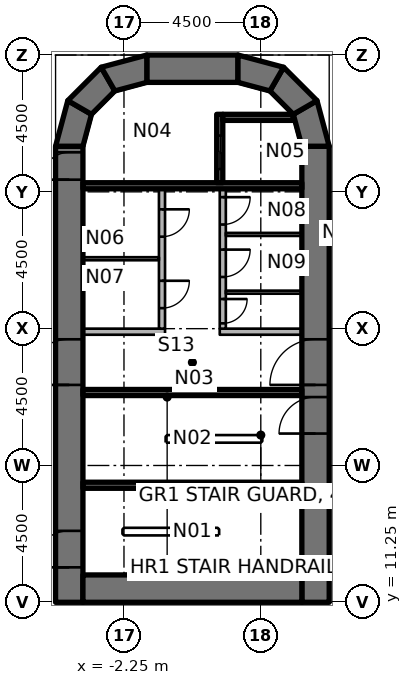
"""IFC4 building model, lengths in metres.
Left out: names, types, materials, properties, quantities, classifications, styles, units other than length and angle.
Written with IfcOpenShell. Run it as: python <this file> out.ifc"""

import sys

from ifc_helpers import new_model, si_unit, direction, frame, frame_2d, origin, place, context, subcontext, project, spatial, polyline, rectangle, outline, extrude, element, fill, save


model = new_model("IFC4")
c1 = context("Model", 3, precision=1e-05, world=origin(), true_north=direction((0.0, 1.0)))
c2 = subcontext(c1, "Body", "Model", "MODEL_VIEW")
j1 = project(units=[si_unit("LENGTHUNIT", "METRE"), si_unit("PLANEANGLEUNIT", "RADIAN")], contexts=[c1])
p1 = place(None, origin())
s1 = spatial("IfcSite", under=j1, at=p1, CompositionType="ELEMENT")
p2 = place(p1, origin())
s2 = spatial("IfcBuilding", under=s1, at=p2, CompositionType="ELEMENT")
p3 = place(p2, frame((0.0, 0.0, -8.0)))
s3 = spatial("IfcBuildingStorey", under=s2, at=p3, CompositionType="ELEMENT", Elevation=-8.0)
p4 = place(p3, frame((-4.05, 11.25, 0.0), z_axis=(0.0, 0.0, 1.0), x_axis=(0.0, 1.0, 0.0)))
e1 = element("IfcWall", 1, at=p4, inside=s3, PredefinedType="SHEAR", context=c2, shape_type="SweptSolid", body=[
    extrude(rectangle(XDim=15.0, YDim=0.9, at=frame_2d((7.5, 0.0))), origin(), (0.0, 0.0, 1.0), 4.0),
])
p5 = place(p4, frame((7.15, 0.0, 0.0)))
e2 = element("IfcOpeningElement", 2, at=p5, cuts=e1, PredefinedType="OPENING", context=c2, shape_type="SweptSolid", body=[
    extrude(rectangle(XDim=1.5, YDim=2.3, at=frame_2d((0.75, 1.15))), frame((0.0, 0.46, 0.0), z_axis=(0.0, -1.0, 0.0), x_axis=(1.0, 0.0, 0.0)), (0.0, 0.0, 1.0), 0.92),
])
p6 = place(p4, frame((13.9, 0.0, 0.0)))
e3 = element("IfcOpeningElement", 3, at=p6, cuts=e1, PredefinedType="OPENING", context=c2, shape_type="SweptSolid", body=[
    extrude(rectangle(XDim=0.9, YDim=2.1, at=frame_2d((0.45, 1.05))), frame((0.0, 0.46, 0.0), z_axis=(0.0, -1.0, 0.0), x_axis=(1.0, 0.0, 0.0)), (0.0, 0.0, 1.0), 0.92),
])
p7 = place(p4, frame((1.15, 0.0, 0.0)))
e4 = element("IfcOpeningElement", 4, at=p7, cuts=e1, PredefinedType="OPENING", context=c2, shape_type="SweptSolid", body=[
    extrude(rectangle(XDim=1.2, YDim=2.1, at=frame_2d((0.6, 1.05))), frame((0.0, 0.46, 0.0), z_axis=(0.0, -1.0, 0.0), x_axis=(1.0, 0.0, 0.0)), (0.0, 0.0, 1.0), 0.92),
])
p8 = place(p3, frame((4.05, 11.25, 0.0), z_axis=(0.0, 0.0, 1.0), x_axis=(0.0, 1.0, 0.0)))
e5 = element("IfcWall", 5, at=p8, inside=s3, PredefinedType="SHEAR", context=c2, shape_type="SweptSolid", body=[
    extrude(rectangle(XDim=15.0, YDim=0.9, at=frame_2d((7.5, 0.0))), origin(), (0.0, 0.0, 1.0), 4.0),
])
p9 = place(p8, frame((7.15, 0.0, 0.0)))
e6 = element("IfcOpeningElement", 6, at=p9, cuts=e5, PredefinedType="OPENING", context=c2, shape_type="SweptSolid", body=[
    extrude(rectangle(XDim=1.5, YDim=2.3, at=frame_2d((0.75, 1.15))), frame((0.0, 0.46, 0.0), z_axis=(0.0, -1.0, 0.0), x_axis=(1.0, 0.0, 0.0)), (0.0, 0.0, 1.0), 0.92),
])
p10 = place(p8, frame((5.55, 0.0, 0.0)))
e7 = element("IfcOpeningElement", 7, at=p10, cuts=e5, PredefinedType="OPENING", context=c2, shape_type="SweptSolid", body=[
    extrude(rectangle(XDim=1.2, YDim=2.1, at=frame_2d((0.6, 1.05))), frame((0.0, 0.46, 0.0), z_axis=(0.0, -1.0, 0.0), x_axis=(1.0, 0.0, 0.0)), (0.0, 0.0, 1.0), 0.92),
])
p11 = place(p3, frame((-3.6, 11.7, 0.0), z_axis=(0.0, 0.0, 1.0), x_axis=(1.0, 0.0, 0.0)))
e8 = element("IfcWall", 8, at=p11, inside=s3, PredefinedType="SHEAR", context=c2, shape_type="SweptSolid", body=[
    extrude(rectangle(XDim=7.2, YDim=0.9, at=frame_2d((3.6, 0.0))), origin(), (0.0, 0.0, 1.0), 4.0),
])
p12 = place(p3, frame((-1.5, 28.8, 0.0), z_axis=(0.0, 0.0, 1.0), x_axis=(1.0, 0.0, 0.0)))
e9 = element("IfcWall", 9, at=p12, inside=s3, PredefinedType="SHEAR", context=c2, shape_type="SweptSolid", body=[
    extrude(rectangle(XDim=3.0, YDim=0.9, at=frame_2d((1.5, 0.0))), origin(), (0.0, 0.0, 1.0), 4.0),
])
p13 = place(p3, origin())
e10 = element("IfcWall", 10, at=p13, inside=s3, PredefinedType="SHEAR", context=c2, shape_type="SweptSolid", body=[
    extrude(outline(polyline([(-4.5, 26.25), (-4.098, 27.75), (-3.319, 27.3), (-3.6, 26.25), (-4.5, 26.25)])), origin(), (0.0, 0.0, 1.0), 4.0),
])
p14 = place(p3, origin())
e11 = element("IfcWall", 11, at=p14, inside=s3, PredefinedType="SHEAR", context=c2, shape_type="SweptSolid", body=[
    extrude(outline(polyline([(-4.098, 27.75), (-3.0, 28.848), (-2.55, 28.069), (-3.319, 27.3), (-4.098, 27.75)])), origin(), (0.0, 0.0, 1.0), 4.0),
])
p15 = place(p3, origin())
e12 = element("IfcWall", 12, at=p15, inside=s3, PredefinedType="SHEAR", context=c2, shape_type="SweptSolid", body=[
    extrude(outline(polyline([(-3.0, 28.848), (-1.5, 29.25), (-1.5, 28.35), (-2.55, 28.069), (-3.0, 28.848)])), origin(), (0.0, 0.0, 1.0), 4.0),
])
p16 = place(p3, origin())
e13 = element("IfcWall", 13, at=p16, inside=s3, PredefinedType="SHEAR", context=c2, shape_type="SweptSolid", body=[
    extrude(outline(polyline([(4.5, 26.25), (4.098, 27.75), (3.319, 27.3), (3.6, 26.25), (4.5, 26.25)])), origin(), (0.0, 0.0, 1.0), 4.0),
])
p17 = place(p3, origin())
e14 = element("IfcWall", 14, at=p17, inside=s3, PredefinedType="SHEAR", context=c2, shape_type="SweptSolid", body=[
    extrude(outline(polyline([(4.098, 27.75), (3.0, 28.848), (2.55, 28.069), (3.319, 27.3), (4.098, 27.75)])), origin(), (0.0, 0.0, 1.0), 4.0),
])
p18 = place(p3, origin())
e15 = element("IfcWall", 15, at=p18, inside=s3, PredefinedType="SHEAR", context=c2, shape_type="SweptSolid", body=[
    extrude(outline(polyline([(3.0, 28.848), (1.5, 29.25), (1.5, 28.35), (2.55, 28.069), (3.0, 28.848)])), origin(), (0.0, 0.0, 1.0), 4.0),
])
p19 = place(p3, frame((-3.6, 24.95, 0.0), z_axis=(0.0, 0.0, 1.0), x_axis=(1.0, 0.0, 0.0)))
e16 = element("IfcWall", 16, at=p19, inside=s3, PredefinedType="SHEAR", context=c2, shape_type="SweptSolid", body=[
    extrude(rectangle(XDim=7.2, YDim=0.2, at=frame_2d((3.6, 0.0))), origin(), (0.0, 0.0, 1.0), 3.4),
])
p20 = place(p3, frame((0.9, 27.3, 0.0), z_axis=(0.0, 0.0, 1.0), x_axis=(0.0, -1.0, 0.0)))
e17 = element("IfcWall", 17, at=p20, inside=s3, PredefinedType="SHEAR", context=c2, shape_type="SweptSolid", body=[
    extrude(rectangle(XDim=2.25, YDim=0.2, at=frame_2d((1.125, 0.0))), origin(), (0.0, 0.0, 1.0), 3.4),
])
p21 = place(p20, frame((0.7, 0.0, 0.0)))
e18 = element("IfcOpeningElement", 18, at=p21, cuts=e17, PredefinedType="OPENING", context=c2, shape_type="SweptSolid", body=[
    extrude(rectangle(XDim=1.1, YDim=2.3, at=frame_2d((0.55, 1.15))), frame((0.0, 0.11, 0.0), z_axis=(0.0, -1.0, 0.0), x_axis=(1.0, 0.0, 0.0)), (0.0, 0.0, 1.0), 0.22),
])
p22 = place(p3, origin())
e19 = element("IfcWall", 19, at=p22, inside=s3, PredefinedType="SHEAR", context=c2, shape_type="SweptSolid", body=[
    extrude(outline(polyline([(1.0, 27.1), (3.341, 27.1), (3.291, 27.284), (3.275, 27.3), (1.0, 27.3), (1.0, 27.1)])), origin(), (0.0, 0.0, 1.0), 3.4),
])
for number, where, z_axis, x_axis in (
    (20, (-3.6, 18.15, 0.0), (0.0, 0.0, 1.0), (1.0, 0.0, 0.0)),
    (21, (-3.6, 15.1, 0.0), (0.0, 0.0, 1.0), (1.0, 0.0, 0.0)),
):
    element("IfcWall", number, at=place(p3, frame(where, z_axis=z_axis, x_axis=x_axis)), inside=s3, PredefinedType="SHEAR", context=c2, shape_type="SweptSolid", body=[
        extrude(rectangle(XDim=7.2, YDim=0.2, at=frame_2d((3.6, 0.0))), origin(), (0.0, 0.0, 1.0), 3.4),
    ])
p23 = place(p3, frame((-3.6, 20.15, 0.0), z_axis=(0.0, 0.0, 1.0), x_axis=(1.0, 0.0, 0.0)))
e22 = element("IfcWall", 22, at=p23, inside=s3, PredefinedType="PARTITIONING", context=c2, shape_type="SweptSolid", body=[
    extrude(rectangle(XDim=2.7, YDim=0.2, at=frame_2d((1.35, 0.0))), origin(), (0.0, 0.0, 1.0), 3.4),
])
p24 = place(p3, frame((-1.0, 24.85, 0.0), z_axis=(0.0, 0.0, 1.0), x_axis=(0.0, -1.0, 0.0)))
e23 = element("IfcWall", 23, at=p24, inside=s3, PredefinedType="PARTITIONING", context=c2, shape_type="SweptSolid", body=[
    extrude(rectangle(XDim=4.6, YDim=0.2, at=frame_2d((2.3, 0.0))), origin(), (0.0, 0.0, 1.0), 3.4),
])
p25 = place(p24, frame((0.675, 0.0, 0.0)))
e24 = element("IfcOpeningElement", 24, at=p25, cuts=e23, PredefinedType="OPENING", context=c2, shape_type="SweptSolid", body=[
    extrude(rectangle(XDim=0.9, YDim=2.1, at=frame_2d((0.45, 1.05))), frame((0.0, 0.11, 0.0), z_axis=(0.0, -1.0, 0.0), x_axis=(1.0, 0.0, 0.0)), (0.0, 0.0, 1.0), 0.22),
])
p26 = place(p24, frame((3.025, 0.0, 0.0)))
e25 = element("IfcOpeningElement", 25, at=p26, cuts=e23, PredefinedType="OPENING", context=c2, shape_type="SweptSolid", body=[
    extrude(rectangle(XDim=0.9, YDim=2.1, at=frame_2d((0.45, 1.05))), frame((0.0, 0.11, 0.0), z_axis=(0.0, -1.0, 0.0), x_axis=(1.0, 0.0, 0.0)), (0.0, 0.0, 1.0), 0.22),
])
p27 = place(p3, frame((0.9, 20.15, 0.0), z_axis=(0.0, 0.0, 1.0), x_axis=(1.0, 0.0, 0.0)))
e26 = element("IfcWall", 26, at=p27, inside=s3, PredefinedType="PARTITIONING", context=c2, shape_type="SweptSolid", body=[
    extrude(rectangle(XDim=2.7, YDim=0.2, at=frame_2d((1.35, 0.0))), origin(), (0.0, 0.0, 1.0), 3.4),
])
p28 = place(p3, frame((1.0, 24.85, 0.0), z_axis=(0.0, 0.0, 1.0), x_axis=(0.0, -1.0, 0.0)))
e27 = element("IfcWall", 27, at=p28, inside=s3, PredefinedType="PARTITIONING", context=c2, shape_type="SweptSolid", body=[
    extrude(rectangle(XDim=4.6, YDim=0.2, at=frame_2d((2.3, 0.0))), origin(), (0.0, 0.0, 1.0), 3.4),
])
p29 = place(p28, frame((0.275, 0.0, 0.0)))
e28 = element("IfcOpeningElement", 28, at=p29, cuts=e27, PredefinedType="OPENING", context=c2, shape_type="SweptSolid", body=[
    extrude(rectangle(XDim=0.9, YDim=2.1, at=frame_2d((0.45, 1.05))), frame((0.0, 0.11, 0.0), z_axis=(0.0, -1.0, 0.0), x_axis=(1.0, 0.0, 0.0)), (0.0, 0.0, 1.0), 0.22),
])
p30 = place(p28, frame((2.0, 0.0, 0.0)))
e29 = element("IfcOpeningElement", 29, at=p30, cuts=e27, PredefinedType="OPENING", context=c2, shape_type="SweptSolid", body=[
    extrude(rectangle(XDim=0.9, YDim=2.1, at=frame_2d((0.45, 1.05))), frame((0.0, 0.11, 0.0), z_axis=(0.0, -1.0, 0.0), x_axis=(1.0, 0.0, 0.0)), (0.0, 0.0, 1.0), 0.22),
])
p31 = place(p28, frame((3.625, 0.0, 0.0)))
e30 = element("IfcOpeningElement", 30, at=p31, cuts=e27, PredefinedType="OPENING", context=c2, shape_type="SweptSolid", body=[
    extrude(rectangle(XDim=0.8, YDim=2.1, at=frame_2d((0.4, 1.05))), frame((0.0, 0.11, 0.0), z_axis=(0.0, -1.0, 0.0), x_axis=(1.0, 0.0, 0.0)), (0.0, 0.0, 1.0), 0.22),
])
for number, where, z_axis, x_axis in (
    (31, (-3.6, 22.55, 0.0), (0.0, 0.0, 1.0), (1.0, 0.0, 0.0)),
    (32, (1.1, 23.35, 0.0), (0.0, 0.0, 1.0), (1.0, 0.0, 0.0)),
    (33, (1.1, 21.45, 0.0), (0.0, 0.0, 1.0), (1.0, 0.0, 0.0)),
):
    element("IfcWall", number, at=place(p3, frame(where, z_axis=z_axis, x_axis=x_axis)), inside=s3, PredefinedType="PARTITIONING", context=c2, shape_type="SweptSolid", body=[
        extrude(rectangle(XDim=2.5, YDim=0.1, at=frame_2d((1.25, 0.0))), origin(), (0.0, 0.0, 1.0), 3.4),
    ])
p32 = place(p5, origin())
e34 = element("IfcDoor", 34, at=p32, inside=s3, OperationType="DOUBLE_DOOR_SINGLE_SWING", PredefinedType="DOOR", context=c2, shape_type="SweptSolid", body=[
    extrude(rectangle(XDim=1.5, YDim=2.3, at=frame_2d((0.75, 1.15))), frame((0.0, 0.025, 0.0), z_axis=(0.0, -1.0, 0.0), x_axis=(1.0, 0.0, 0.0)), (0.0, 0.0, 1.0), 0.05),
])
fill(e2, e34)
p33 = place(p9, origin())
e35 = element("IfcDoor", 35, at=p33, inside=s3, OperationType="DOUBLE_DOOR_SINGLE_SWING", PredefinedType="DOOR", context=c2, shape_type="SweptSolid", body=[
    extrude(rectangle(XDim=1.5, YDim=2.3, at=frame_2d((0.75, 1.15))), frame((0.0, 0.025, 0.0), z_axis=(0.0, -1.0, 0.0), x_axis=(1.0, 0.0, 0.0)), (0.0, 0.0, 1.0), 0.05),
])
fill(e6, e35)
p34 = place(p6, origin())
e36 = element("IfcDoor", 36, at=p34, inside=s3, OperationType="SINGLE_SWING_LEFT", PredefinedType="DOOR", context=c2, shape_type="SweptSolid", body=[
    extrude(rectangle(XDim=0.9, YDim=2.1, at=frame_2d((0.45, 1.05))), frame((0.0, 0.025, 0.0), z_axis=(0.0, -1.0, 0.0), x_axis=(1.0, 0.0, 0.0)), (0.0, 0.0, 1.0), 0.05),
])
fill(e3, e36)
p35 = place(p10, origin())
e37 = element("IfcDoor", 37, at=p35, inside=s3, OperationType="SINGLE_SWING_LEFT", PredefinedType="DOOR", context=c2, shape_type="SweptSolid", body=[
    extrude(rectangle(XDim=1.2, YDim=2.1, at=frame_2d((0.6, 1.05))), frame((0.0, 0.025, 0.0), z_axis=(0.0, -1.0, 0.0), x_axis=(1.0, 0.0, 0.0)), (0.0, 0.0, 1.0), 0.05),
])
fill(e7, e37)
p36 = place(p7, origin())
e38 = element("IfcDoor", 38, at=p36, inside=s3, OperationType="SINGLE_SWING_LEFT", PredefinedType="DOOR", context=c2, shape_type="SweptSolid", body=[
    extrude(rectangle(XDim=1.2, YDim=2.1, at=frame_2d((0.6, 1.05))), frame((0.0, 0.025, 0.0), z_axis=(0.0, -1.0, 0.0), x_axis=(1.0, 0.0, 0.0)), (0.0, 0.0, 1.0), 0.05),
])
fill(e4, e38)
p37 = place(p21, origin())
e39 = element("IfcDoor", 39, at=p37, inside=s3, OperationType="DOUBLE_DOOR_SLIDING", PredefinedType="DOOR", context=c2, shape_type="SweptSolid", body=[
    extrude(rectangle(XDim=1.1, YDim=2.3, at=frame_2d((0.55, 1.15))), frame((0.0, 0.025, 0.0), z_axis=(0.0, -1.0, 0.0), x_axis=(1.0, 0.0, 0.0)), (0.0, 0.0, 1.0), 0.05),
])
fill(e18, e39)
p38 = place(p25, origin())
e40 = element("IfcDoor", 40, at=p38, inside=s3, OperationType="SINGLE_SWING_LEFT", PredefinedType="DOOR", context=c2, shape_type="SweptSolid", body=[
    extrude(rectangle(XDim=0.9, YDim=2.1, at=frame_2d((0.45, 1.05))), frame((0.0, 0.025, 0.0), z_axis=(0.0, -1.0, 0.0), x_axis=(1.0, 0.0, 0.0)), (0.0, 0.0, 1.0), 0.05),
])
fill(e24, e40)
p39 = place(p26, origin())
e41 = element("IfcDoor", 41, at=p39, inside=s3, OperationType="SINGLE_SWING_RIGHT", PredefinedType="DOOR", context=c2, shape_type="SweptSolid", body=[
    extrude(rectangle(XDim=0.9, YDim=2.1, at=frame_2d((0.45, 1.05))), frame((0.0, 0.025, 0.0), z_axis=(0.0, -1.0, 0.0), x_axis=(1.0, 0.0, 0.0)), (0.0, 0.0, 1.0), 0.05),
])
fill(e25, e41)
p40 = place(p29, origin())
e42 = element("IfcDoor", 42, at=p40, inside=s3, OperationType="SINGLE_SWING_LEFT", PredefinedType="DOOR", context=c2, shape_type="SweptSolid", body=[
    extrude(rectangle(XDim=0.9, YDim=2.1, at=frame_2d((0.45, 1.05))), frame((0.0, 0.025, 0.0), z_axis=(0.0, -1.0, 0.0), x_axis=(1.0, 0.0, 0.0)), (0.0, 0.0, 1.0), 0.05),
])
fill(e28, e42)
p41 = place(p30, origin())
e43 = element("IfcDoor", 43, at=p41, inside=s3, OperationType="SINGLE_SWING_LEFT", PredefinedType="DOOR", context=c2, shape_type="SweptSolid", body=[
    extrude(rectangle(XDim=0.9, YDim=2.1, at=frame_2d((0.45, 1.05))), frame((0.0, 0.025, 0.0), z_axis=(0.0, -1.0, 0.0), x_axis=(1.0, 0.0, 0.0)), (0.0, 0.0, 1.0), 0.05),
])
fill(e29, e43)
p42 = place(p31, origin())
e44 = element("IfcDoor", 44, at=p42, inside=s3, OperationType="SINGLE_SWING_RIGHT", PredefinedType="DOOR", context=c2, shape_type="SweptSolid", body=[
    extrude(rectangle(XDim=0.8, YDim=2.1, at=frame_2d((0.4, 1.05))), frame((0.0, 0.025, 0.0), z_axis=(0.0, -1.0, 0.0), x_axis=(1.0, 0.0, 0.0)), (0.0, 0.0, 1.0), 0.05),
])
fill(e30, e44)
save(model, sys.argv[1])
